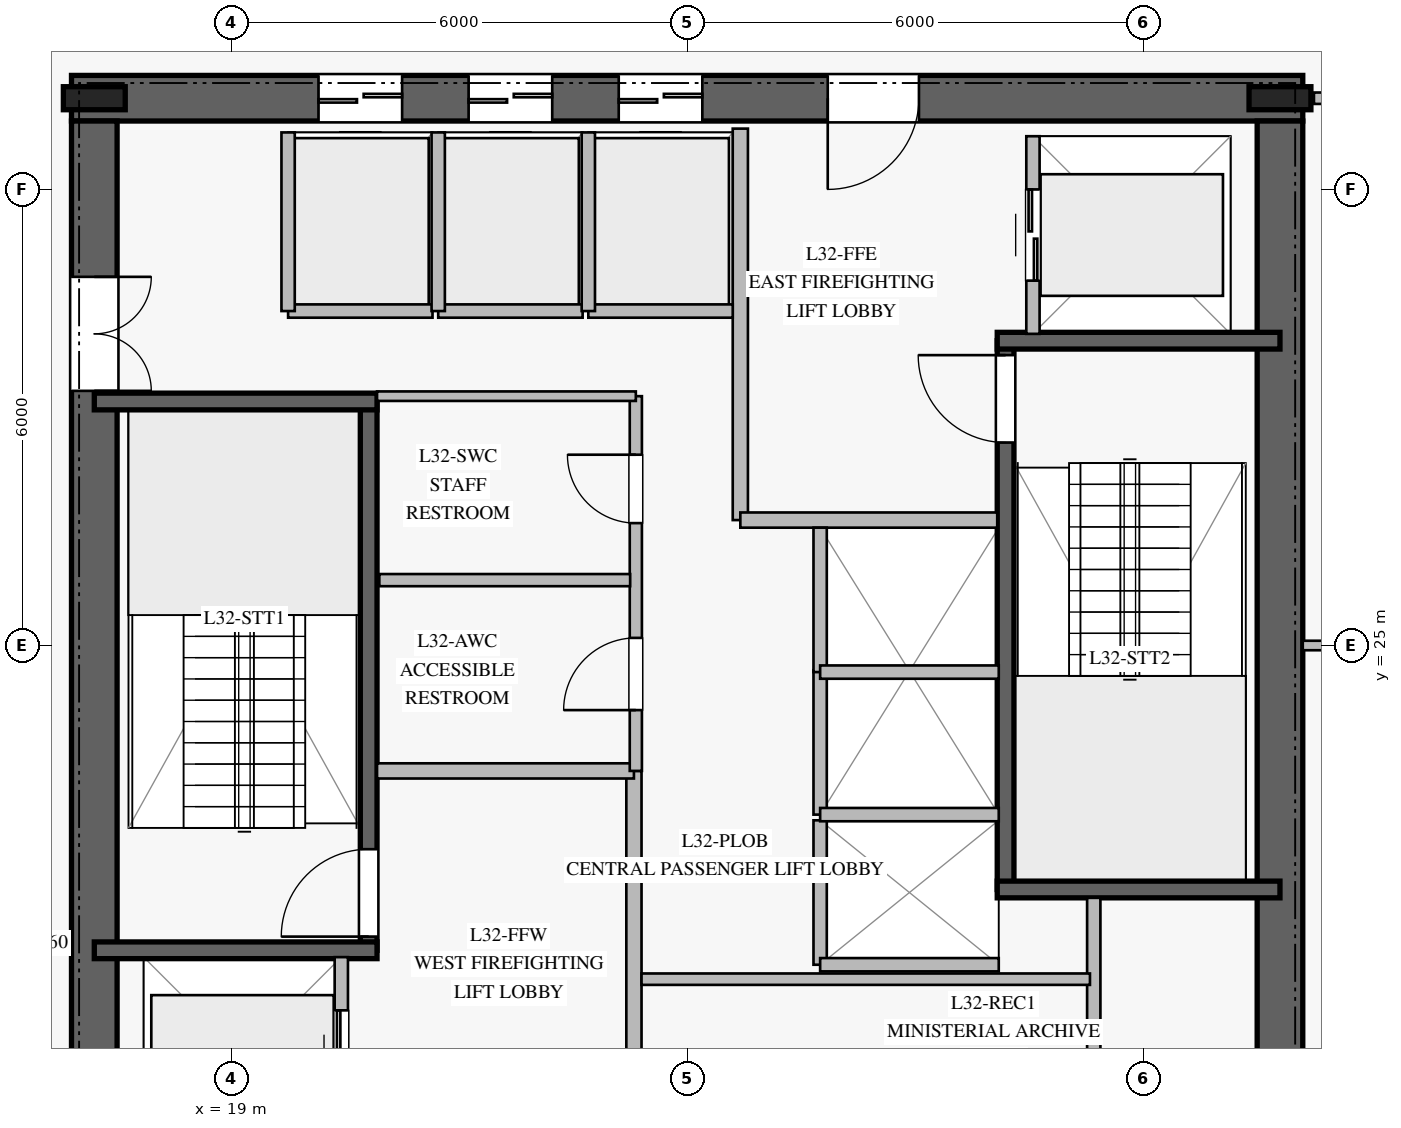
"""IFC4 building model, lengths in metres.
Left out: names, types, materials, properties, quantities, classifications, styles, units other than length and angle.
Written with IfcOpenShell. Run it as: python <this file> out.ifc"""

import sys

from ifc_helpers import new_model, si_unit, direction, frame, frame_2d, origin, origin_2d, place, context, subcontext, project, spatial, rectangle, i_section, extrude, element, fill, save


model = new_model("IFC4")
c1 = context("Model", 3, precision=1e-05, world=origin(), true_north=direction((0.0, 1.0)))
c2 = subcontext(c1, "Body", "Model", "MODEL_VIEW")
j1 = project(units=[si_unit("LENGTHUNIT", "METRE"), si_unit("PLANEANGLEUNIT", "RADIAN")], contexts=[c1])
p1 = place(None, origin())
s1 = spatial("IfcSite", under=j1, at=p1, CompositionType="ELEMENT")
p2 = place(p1, origin())
s2 = spatial("IfcBuilding", under=s1, at=p2, CompositionType="ELEMENT")
p3 = place(p2, frame((0.0, 0.0, 134.4)))
s3 = spatial("IfcBuildingStorey", under=s2, at=p3, CompositionType="ELEMENT", Elevation=134.4)
p4 = place(p3, frame((33.1, 32.2, 0.0), z_axis=(0.0, 0.0, 1.0), x_axis=(-1.0, 0.0, 0.0)))
e1 = element("IfcWall", 1, at=p4, inside=s3, PredefinedType="SHEAR", context=c2, shape_type="SweptSolid", body=[
    extrude(rectangle(XDim=16.2, YDim=0.6, at=frame_2d((8.1, 0.0))), origin(), (0.0, 0.0, 1.0), 3.76),
])
p5 = place(p4, frame((5.05, 0.0, 0.0)))
e2 = element("IfcOpeningElement", 2, at=p5, cuts=e1, PredefinedType="OPENING", context=c2, shape_type="SweptSolid", body=[
    extrude(rectangle(XDim=1.2, YDim=2.25, at=frame_2d((0.6, 1.125))), frame((0.0, 0.31, 0.0), z_axis=(0.0, -1.0, 0.0), x_axis=(1.0, 0.0, 0.0)), (0.0, 0.0, 1.0), 0.62),
])
p6 = place(p4, frame((11.85, 0.0, 0.0)))
e3 = element("IfcOpeningElement", 3, at=p6, cuts=e1, PredefinedType="OPENING", context=c2, shape_type="SweptSolid", body=[
    extrude(rectangle(XDim=1.1, YDim=2.2, at=frame_2d((0.55, 1.1))), frame((0.0, 0.31, 0.0), z_axis=(0.0, -1.0, 0.0), x_axis=(1.0, 0.0, 0.0)), (0.0, 0.0, 1.0), 0.62),
])
p7 = place(p4, frame((9.875, 0.0, 0.0)))
e4 = element("IfcOpeningElement", 4, at=p7, cuts=e1, PredefinedType="OPENING", context=c2, shape_type="SweptSolid", body=[
    extrude(rectangle(XDim=1.1, YDim=2.2, at=frame_2d((0.55, 1.1))), frame((0.0, 0.31, 0.0), z_axis=(0.0, -1.0, 0.0), x_axis=(1.0, 0.0, 0.0)), (0.0, 0.0, 1.0), 0.62),
])
p8 = place(p4, frame((7.9, 0.0, 0.0)))
e5 = element("IfcOpeningElement", 5, at=p8, cuts=e1, PredefinedType="OPENING", context=c2, shape_type="SweptSolid", body=[
    extrude(rectangle(XDim=1.1, YDim=2.2, at=frame_2d((0.55, 1.1))), frame((0.0, 0.31, 0.0), z_axis=(0.0, -1.0, 0.0), x_axis=(1.0, 0.0, 0.0)), (0.0, 0.0, 1.0), 0.62),
])
p9 = place(p3, frame((17.2, 31.9, 0.0), z_axis=(0.0, 0.0, 1.0), x_axis=(0.0, -1.0, 0.0)))
e6 = element("IfcWall", 6, at=p9, inside=s3, PredefinedType="SHEAR", context=c2, shape_type="SweptSolid", body=[
    extrude(rectangle(XDim=13.8, YDim=0.6, at=frame_2d((6.9, 0.0))), origin(), (0.0, 0.0, 1.0), 3.76),
])
p10 = place(p9, frame((2.05, 0.0, 0.0)))
e7 = element("IfcOpeningElement", 7, at=p10, cuts=e6, PredefinedType="OPENING", context=c2, shape_type="SweptSolid", body=[
    extrude(rectangle(XDim=1.5, YDim=2.2, at=frame_2d((0.75, 1.1))), frame((0.0, 0.31, 0.0), z_axis=(0.0, -1.0, 0.0), x_axis=(1.0, 0.0, 0.0)), (0.0, 0.0, 1.0), 0.62),
])
p11 = place(p3, frame((32.8, 18.1, 0.0), z_axis=(0.0, 0.0, 1.0), x_axis=(0.0, 1.0, 0.0)))
e8 = element("IfcWall", 8, at=p11, inside=s3, PredefinedType="SHEAR", context=c2, shape_type="SweptSolid", body=[
    extrude(rectangle(XDim=13.8, YDim=0.6, at=frame_2d((6.9, 0.0))), origin(), (0.0, 0.0, 1.0), 3.76),
])
for number, where, z_axis, x_axis in (
    (9, (32.8, 32.2, 0.0), (0.0, 0.0, 1.0), (1.0, 0.0, 0.0)),
    (10, (17.2, 32.2, 0.0), (0.0, 0.0, 1.0), (1.0, 0.0, 0.0)),
):
    element("IfcColumn", number, at=place(p3, frame(where, z_axis=z_axis, x_axis=x_axis)), inside=s3, PredefinedType="COLUMN", context=c2, shape_type="SweptSolid", body=[
        extrude(i_section(OverallWidth=0.303, OverallDepth=0.814, WebThickness=0.021, FlangeThickness=0.04, at=origin_2d()), origin(), (0.0, 0.0, 1.0), 4.0),
    ])
p12 = place(p3, frame((20.81, 20.99, 0.0), z_axis=(0.0, 0.0, 1.0), x_axis=(0.0, 1.0, 0.0)))
e11 = element("IfcWall", 11, at=p12, inside=s3, PredefinedType="SOLIDWALL", context=c2, shape_type="SweptSolid", body=[
    extrude(rectangle(XDim=7.22, YDim=0.22, at=frame_2d((3.61, 0.0))), origin(), (0.0, 0.0, 1.0), 3.76),
])
p13 = place(p12, frame((0.18, 0.0, 0.0)))
e12 = element("IfcOpeningElement", 12, at=p13, cuts=e11, PredefinedType="OPENING", context=c2, shape_type="SweptSolid", body=[
    extrude(rectangle(XDim=1.15, YDim=2.2, at=frame_2d((0.575, 1.1))), frame((0.0, 0.12, 0.0), z_axis=(0.0, -1.0, 0.0), x_axis=(1.0, 0.0, 0.0)), (0.0, 0.0, 1.0), 0.24),
])
for number, where, z_axis, x_axis in (
    (13, (17.2, 20.99, 0.0), (0.0, 0.0, 1.0), (1.0, 0.0, 0.0)),
    (14, (17.2, 28.21, 0.0), (0.0, 0.0, 1.0), (1.0, 0.0, 0.0)),
):
    element("IfcWall", number, at=place(p3, frame(where, z_axis=z_axis, x_axis=x_axis)), inside=s3, PredefinedType="SOLIDWALL", context=c2, shape_type="SweptSolid", body=[
        extrude(rectangle(XDim=3.72, YDim=0.22, at=frame_2d((1.86, 0.0))), origin(), (0.0, 0.0, 1.0), 3.76),
    ])
p14 = place(p3, frame((29.19, 21.79, 0.0), z_axis=(0.0, 0.0, 1.0), x_axis=(0.0, 1.0, 0.0)))
e15 = element("IfcWall", 15, at=p14, inside=s3, PredefinedType="SOLIDWALL", context=c2, shape_type="SweptSolid", body=[
    extrude(rectangle(XDim=7.22, YDim=0.22, at=frame_2d((3.61, 0.0))), origin(), (0.0, 0.0, 1.0), 3.76),
])
p15 = place(p14, frame((5.88, 0.0, 0.0)))
e16 = element("IfcOpeningElement", 16, at=p15, cuts=e15, PredefinedType="OPENING", context=c2, shape_type="SweptSolid", body=[
    extrude(rectangle(XDim=1.15, YDim=2.2, at=frame_2d((0.575, 1.1))), frame((0.0, 0.12, 0.0), z_axis=(0.0, -1.0, 0.0), x_axis=(1.0, 0.0, 0.0)), (0.0, 0.0, 1.0), 0.24),
])
for number, where, z_axis, x_axis in (
    (17, (29.08, 21.79, 0.0), (0.0, 0.0, 1.0), (1.0, 0.0, 0.0)),
    (18, (29.08, 29.01, 0.0), (0.0, 0.0, 1.0), (1.0, 0.0, 0.0)),
):
    element("IfcWall", number, at=place(p3, frame(where, z_axis=z_axis, x_axis=x_axis)), inside=s3, PredefinedType="SOLIDWALL", context=c2, shape_type="SweptSolid", body=[
        extrude(rectangle(XDim=3.72, YDim=0.22, at=frame_2d((1.86, 0.0))), origin(), (0.0, 0.0, 1.0), 3.76),
    ])
p16 = place(p3, frame((24.3, 18.2, 0.0), z_axis=(0.0, 0.0, 1.0), x_axis=(0.0, 1.0, 0.0)))
e19 = element("IfcWall", 19, at=p16, inside=s3, PredefinedType="PARTITIONING", context=c2, shape_type="SweptSolid", body=[
    extrude(rectangle(XDim=5.15, YDim=0.2, at=frame_2d((2.575, 0.0))), origin(), (0.0, 0.0, 1.0), 3.76),
])
p17 = place(p3, frame((20.92, 23.35, 0.0), z_axis=(0.0, 0.0, 1.0), x_axis=(1.0, 0.0, 0.0)))
e20 = element("IfcWall", 20, at=p17, inside=s3, PredefinedType="PARTITIONING", context=c2, shape_type="SweptSolid", body=[
    extrude(rectangle(XDim=3.38, YDim=0.2, at=frame_2d((1.69, 0.0))), origin(), (0.0, 0.0, 1.0), 3.76),
])
p18 = place(p3, frame((25.7, 26.65, 0.0), z_axis=(0.0, 0.0, 1.0), x_axis=(0.0, 1.0, 0.0)))
e21 = element("IfcWall", 21, at=p18, inside=s3, PredefinedType="PARTITIONING", context=c2, shape_type="SweptSolid", body=[
    extrude(rectangle(XDim=5.15, YDim=0.2, at=frame_2d((2.575, 0.0))), origin(), (0.0, 0.0, 1.0), 3.76),
])
p19 = place(p3, frame((25.7, 26.65, 0.0), z_axis=(0.0, 0.0, 1.0), x_axis=(1.0, 0.0, 0.0)))
e22 = element("IfcWall", 22, at=p19, inside=s3, PredefinedType="PARTITIONING", context=c2, shape_type="SweptSolid", body=[
    extrude(rectangle(XDim=3.38, YDim=0.2, at=frame_2d((1.69, 0.0))), origin(), (0.0, 0.0, 1.0), 3.76),
])
p20 = place(p3, frame((24.325, 23.35, 0.0), z_axis=(0.0, 0.0, 1.0), x_axis=(0.0, 1.0, 0.0)))
e23 = element("IfcWall", 23, at=p20, inside=s3, PredefinedType="PLUMBINGWALL", context=c2, shape_type="SweptSolid", body=[
    extrude(rectangle(XDim=4.93, YDim=0.16, at=frame_2d((2.465, 0.0))), origin(), (0.0, 0.0, 1.0), 3.76),
])
p21 = place(p20, frame((0.8, 0.0, 0.0)))
e24 = element("IfcOpeningElement", 24, at=p21, cuts=e23, PredefinedType="OPENING", context=c2, shape_type="SweptSolid", body=[
    extrude(rectangle(XDim=0.95, YDim=2.1, at=frame_2d((0.475, 1.05))), frame((0.0, 0.09, 0.0), z_axis=(0.0, -1.0, 0.0), x_axis=(1.0, 0.0, 0.0)), (0.0, 0.0, 1.0), 0.18),
])
p22 = place(p20, frame((3.26, 0.0, 0.0)))
e25 = element("IfcOpeningElement", 25, at=p22, cuts=e23, PredefinedType="OPENING", context=c2, shape_type="SweptSolid", body=[
    extrude(rectangle(XDim=0.9, YDim=2.1, at=frame_2d((0.45, 1.05))), frame((0.0, 0.09, 0.0), z_axis=(0.0, -1.0, 0.0), x_axis=(1.0, 0.0, 0.0)), (0.0, 0.0, 1.0), 0.18),
])
p23 = place(p3, frame((20.92, 28.28, 0.0), z_axis=(0.0, 0.0, 1.0), x_axis=(1.0, 0.0, 0.0)))
e26 = element("IfcWall", 26, at=p23, inside=s3, PredefinedType="PARTITIONING", context=c2, shape_type="SweptSolid", body=[
    extrude(rectangle(XDim=3.405, YDim=0.125, at=frame_2d((1.703, 0.0))), origin(), (0.0, 0.0, 1.0), 3.76),
])
p24 = place(p3, frame((20.95, 25.86, 0.0), z_axis=(0.0, 0.0, 1.0), x_axis=(1.0, 0.0, 0.0)))
e27 = element("IfcWall", 27, at=p24, inside=s3, PredefinedType="PLUMBINGWALL", context=c2, shape_type="SweptSolid", body=[
    extrude(rectangle(XDim=3.3, YDim=0.16, at=frame_2d((1.65, 0.0))), origin(), (0.0, 0.0, 1.0), 3.76),
])
p25 = place(p3, frame((30.35, 18.2, 0.0), z_axis=(0.0, 0.0, 1.0), x_axis=(0.0, 1.0, 0.0)))
e28 = element("IfcWall", 28, at=p25, inside=s3, PredefinedType="PARTITIONING", context=c2, shape_type="SweptSolid", body=[
    extrude(rectangle(XDim=3.48, YDim=0.175, at=frame_2d((1.74, 0.0))), origin(), (0.0, 0.0, 1.0), 3.76),
])
p26 = place(p3, frame((24.4, 20.61, 0.0), z_axis=(0.0, 0.0, 1.0), x_axis=(1.0, 0.0, 0.0)))
e29 = element("IfcWall", 29, at=p26, inside=s3, PredefinedType="PARTITIONING", context=c2, shape_type="SweptSolid", body=[
    extrude(rectangle(XDim=5.9, YDim=0.15, at=frame_2d((2.95, 0.0))), origin(), (0.0, 0.0, 1.0), 3.76),
])
p27 = place(p3, frame((19.75, 29.4, 0.0), z_axis=(0.0, 0.0, 1.0), x_axis=(1.0, 0.0, 0.0)))
e30 = element("IfcWall", 30, at=p27, inside=s3, PredefinedType="PARTITIONING", context=c2, shape_type="SweptSolid", body=[
    extrude(rectangle(XDim=1.9, YDim=0.175, at=frame_2d((0.95, 0.0))), origin(), (0.0, 0.0, 1.0), 3.76),
])
p28 = place(p3, frame((19.75, 29.4, 0.0), z_axis=(0.0, 0.0, 1.0), x_axis=(0.0, 1.0, 0.0)))
e31 = element("IfcWall", 31, at=p28, inside=s3, PredefinedType="PARTITIONING", context=c2, shape_type="SweptSolid", body=[
    extrude(rectangle(XDim=2.35, YDim=0.175, at=frame_2d((1.175, 0.0))), origin(), (0.0, 0.0, 1.0), 3.76),
])
p29 = place(p3, frame((21.725, 29.4, 0.0), z_axis=(0.0, 0.0, 1.0), x_axis=(1.0, 0.0, 0.0)))
e32 = element("IfcWall", 32, at=p29, inside=s3, PredefinedType="PARTITIONING", context=c2, shape_type="SweptSolid", body=[
    extrude(rectangle(XDim=1.9, YDim=0.175, at=frame_2d((0.95, 0.0))), origin(), (0.0, 0.0, 1.0), 3.76),
])
p30 = place(p3, frame((21.725, 29.4, 0.0), z_axis=(0.0, 0.0, 1.0), x_axis=(0.0, 1.0, 0.0)))
e33 = element("IfcWall", 33, at=p30, inside=s3, PredefinedType="PARTITIONING", context=c2, shape_type="SweptSolid", body=[
    extrude(rectangle(XDim=2.35, YDim=0.175, at=frame_2d((1.175, 0.0))), origin(), (0.0, 0.0, 1.0), 3.76),
])
p31 = place(p3, frame((23.7, 29.4, 0.0), z_axis=(0.0, 0.0, 1.0), x_axis=(1.0, 0.0, 0.0)))
e34 = element("IfcWall", 34, at=p31, inside=s3, PredefinedType="PARTITIONING", context=c2, shape_type="SweptSolid", body=[
    extrude(rectangle(XDim=1.9, YDim=0.175, at=frame_2d((0.95, 0.0))), origin(), (0.0, 0.0, 1.0), 3.76),
])
p32 = place(p3, frame((23.7, 29.4, 0.0), z_axis=(0.0, 0.0, 1.0), x_axis=(0.0, 1.0, 0.0)))
e35 = element("IfcWall", 35, at=p32, inside=s3, PredefinedType="PARTITIONING", context=c2, shape_type="SweptSolid", body=[
    extrude(rectangle(XDim=2.35, YDim=0.175, at=frame_2d((1.175, 0.0))), origin(), (0.0, 0.0, 1.0), 3.76),
])
p33 = place(p3, frame((26.75, 20.8, 0.0), z_axis=(0.0, 0.0, 1.0), x_axis=(0.0, 1.0, 0.0)))
e36 = element("IfcWall", 36, at=p33, inside=s3, PredefinedType="PARTITIONING", context=c2, shape_type="SweptSolid", body=[
    extrude(rectangle(XDim=1.9, YDim=0.175, at=frame_2d((0.95, 0.0))), origin(), (0.0, 0.0, 1.0), 3.76),
])
p34 = place(p3, frame((26.75, 20.8, 0.0), z_axis=(0.0, 0.0, 1.0), x_axis=(1.0, 0.0, 0.0)))
e37 = element("IfcWall", 37, at=p34, inside=s3, PredefinedType="PARTITIONING", context=c2, shape_type="SweptSolid", body=[
    extrude(rectangle(XDim=2.35, YDim=0.175, at=frame_2d((1.175, 0.0))), origin(), (0.0, 0.0, 1.0), 3.76),
])
p35 = place(p3, frame((26.75, 22.775, 0.0), z_axis=(0.0, 0.0, 1.0), x_axis=(0.0, 1.0, 0.0)))
e38 = element("IfcWall", 38, at=p35, inside=s3, PredefinedType="PARTITIONING", context=c2, shape_type="SweptSolid", body=[
    extrude(rectangle(XDim=1.9, YDim=0.175, at=frame_2d((0.95, 0.0))), origin(), (0.0, 0.0, 1.0), 3.76),
])
p36 = place(p3, frame((26.75, 22.775, 0.0), z_axis=(0.0, 0.0, 1.0), x_axis=(1.0, 0.0, 0.0)))
e39 = element("IfcWall", 39, at=p36, inside=s3, PredefinedType="PARTITIONING", context=c2, shape_type="SweptSolid", body=[
    extrude(rectangle(XDim=2.35, YDim=0.175, at=frame_2d((1.175, 0.0))), origin(), (0.0, 0.0, 1.0), 3.76),
])
p37 = place(p3, frame((26.75, 24.65, 0.0), z_axis=(0.0, 0.0, 1.0), x_axis=(0.0, 1.0, 0.0)))
e40 = element("IfcWall", 40, at=p37, inside=s3, PredefinedType="PARTITIONING", context=c2, shape_type="SweptSolid", body=[
    extrude(rectangle(XDim=1.9, YDim=0.175, at=frame_2d((0.95, 0.0))), origin(), (0.0, 0.0, 1.0), 3.76),
])
p38 = place(p3, frame((26.75, 24.65, 0.0), z_axis=(0.0, 0.0, 1.0), x_axis=(1.0, 0.0, 0.0)))
e41 = element("IfcWall", 41, at=p38, inside=s3, PredefinedType="PARTITIONING", context=c2, shape_type="SweptSolid", body=[
    extrude(rectangle(XDim=2.35, YDim=0.175, at=frame_2d((1.175, 0.0))), origin(), (0.0, 0.0, 1.0), 3.76),
])
p39 = place(p3, frame((20.45, 18.3, 0.0), z_axis=(0.0, 0.0, 1.0), x_axis=(0.0, 1.0, 0.0)))
e42 = element("IfcWall", 42, at=p39, inside=s3, PredefinedType="PARTITIONING", context=c2, shape_type="SweptSolid", body=[
    extrude(rectangle(XDim=2.6, YDim=0.175, at=frame_2d((1.3, 0.0))), origin(), (0.0, 0.0, 1.0), 3.76),
])
p40 = place(p39, frame((0.7, 0.0, 0.0)))
e43 = element("IfcOpeningElement", 43, at=p40, cuts=e42, PredefinedType="OPENING", context=c2, shape_type="SweptSolid", body=[
    extrude(rectangle(XDim=1.2, YDim=2.2, at=frame_2d((0.6, 1.1))), frame((0.0, 0.098, 0.0), z_axis=(0.0, -1.0, 0.0), x_axis=(1.0, 0.0, 0.0)), (0.0, 0.0, 1.0), 0.195),
])
p41 = place(p3, frame((29.55, 29.1, 0.0), z_axis=(0.0, 0.0, 1.0), x_axis=(0.0, 1.0, 0.0)))
e44 = element("IfcWall", 44, at=p41, inside=s3, PredefinedType="PARTITIONING", context=c2, shape_type="SweptSolid", body=[
    extrude(rectangle(XDim=2.6, YDim=0.175, at=frame_2d((1.3, 0.0))), origin(), (0.0, 0.0, 1.0), 3.76),
])
p42 = place(p41, frame((0.7, 0.0, 0.0)))
e45 = element("IfcOpeningElement", 45, at=p42, cuts=e44, PredefinedType="OPENING", context=c2, shape_type="SweptSolid", body=[
    extrude(rectangle(XDim=1.2, YDim=2.2, at=frame_2d((0.6, 1.1))), frame((0.0, 0.098, 0.0), z_axis=(0.0, -1.0, 0.0), x_axis=(1.0, 0.0, 0.0)), (0.0, 0.0, 1.0), 0.195),
])
p43 = place(p3, frame((41.2, 32.2, 0.0), z_axis=(0.0, 0.0, 1.0), x_axis=(-1.0, 0.0, 0.0)))
e46 = element("IfcWall", 46, at=p43, inside=s3, PredefinedType="PARTITIONING", context=c2, shape_type="SweptSolid", body=[
    extrude(rectangle(XDim=7.953, YDim=0.15, at=frame_2d((3.977, 0.0))), origin(), (0.0, 0.0, 1.0), 3.21),
])
p44 = place(p3, frame((33.1, 25.0, 0.0), z_axis=(0.0, 0.0, 1.0), x_axis=(1.0, 0.0, 0.0)))
e47 = element("IfcWall", 47, at=p44, inside=s3, PredefinedType="PARTITIONING", context=c2, shape_type="SweptSolid", body=[
    extrude(rectangle(XDim=11.667, YDim=0.125, at=frame_2d((5.833, 0.0))), origin(), (0.0, 0.0, 1.0), 3.16),
])
p45 = place(p13, origin())
e48 = element("IfcDoor", 48, at=p45, inside=s3, OperationType="SINGLE_SWING_LEFT", PredefinedType="DOOR", context=c2, shape_type="SweptSolid", body=[
    extrude(rectangle(XDim=1.15, YDim=2.2, at=frame_2d((0.575, 1.1))), frame((0.0, 0.025, 0.0), z_axis=(0.0, -1.0, 0.0), x_axis=(1.0, 0.0, 0.0)), (0.0, 0.0, 1.0), 0.05),
])
fill(e12, e48)
p46 = place(p15, origin())
e49 = element("IfcDoor", 49, at=p46, inside=s3, OperationType="SINGLE_SWING_RIGHT", PredefinedType="DOOR", context=c2, shape_type="SweptSolid", body=[
    extrude(rectangle(XDim=1.15, YDim=2.2, at=frame_2d((0.575, 1.1))), frame((0.0, 0.025, 0.0), z_axis=(0.0, -1.0, 0.0), x_axis=(1.0, 0.0, 0.0)), (0.0, 0.0, 1.0), 0.05),
])
fill(e16, e49)
p47 = place(p5, origin())
e50 = element("IfcDoor", 50, at=p47, inside=s3, OperationType="SINGLE_SWING_RIGHT", PredefinedType="DOOR", context=c2, shape_type="SweptSolid", body=[
    extrude(rectangle(XDim=1.2, YDim=2.25, at=frame_2d((0.6, 1.125))), frame((0.0, 0.025, 0.0), z_axis=(0.0, -1.0, 0.0), x_axis=(1.0, 0.0, 0.0)), (0.0, 0.0, 1.0), 0.05),
])
fill(e2, e50)
p48 = place(p10, origin())
e51 = element("IfcDoor", 51, at=p48, inside=s3, OperationType="DOUBLE_DOOR_SINGLE_SWING", PredefinedType="DOOR", context=c2, shape_type="SweptSolid", body=[
    extrude(rectangle(XDim=1.5, YDim=2.2, at=frame_2d((0.75, 1.1))), frame((0.0, 0.025, 0.0), z_axis=(0.0, -1.0, 0.0), x_axis=(1.0, 0.0, 0.0)), (0.0, 0.0, 1.0), 0.05),
])
fill(e7, e51)
p49 = place(p21, origin())
e52 = element("IfcDoor", 52, at=p49, inside=s3, OperationType="SINGLE_SWING_LEFT", PredefinedType="DOOR", context=c2, shape_type="SweptSolid", body=[
    extrude(rectangle(XDim=0.95, YDim=2.1, at=frame_2d((0.475, 1.05))), frame((0.0, 0.025, 0.0), z_axis=(0.0, -1.0, 0.0), x_axis=(1.0, 0.0, 0.0)), (0.0, 0.0, 1.0), 0.05),
])
fill(e24, e52)
p50 = place(p22, origin())
e53 = element("IfcDoor", 53, at=p50, inside=s3, OperationType="SINGLE_SWING_RIGHT", PredefinedType="DOOR", context=c2, shape_type="SweptSolid", body=[
    extrude(rectangle(XDim=0.9, YDim=2.1, at=frame_2d((0.45, 1.05))), frame((0.0, 0.025, 0.0), z_axis=(0.0, -1.0, 0.0), x_axis=(1.0, 0.0, 0.0)), (0.0, 0.0, 1.0), 0.05),
])
fill(e25, e53)
p51 = place(p6, origin())
e54 = element("IfcDoor", 54, at=p51, inside=s3, OperationType="DOUBLE_DOOR_SLIDING", PredefinedType="DOOR", context=c2, shape_type="SweptSolid", body=[
    extrude(rectangle(XDim=1.1, YDim=2.2, at=frame_2d((0.55, 1.1))), frame((0.0, 0.025, 0.0), z_axis=(0.0, -1.0, 0.0), x_axis=(1.0, 0.0, 0.0)), (0.0, 0.0, 1.0), 0.05),
])
fill(e3, e54)
p52 = place(p7, origin())
e55 = element("IfcDoor", 55, at=p52, inside=s3, OperationType="DOUBLE_DOOR_SLIDING", PredefinedType="DOOR", context=c2, shape_type="SweptSolid", body=[
    extrude(rectangle(XDim=1.1, YDim=2.2, at=frame_2d((0.55, 1.1))), frame((0.0, 0.025, 0.0), z_axis=(0.0, -1.0, 0.0), x_axis=(1.0, 0.0, 0.0)), (0.0, 0.0, 1.0), 0.05),
])
fill(e4, e55)
p53 = place(p8, origin())
e56 = element("IfcDoor", 56, at=p53, inside=s3, OperationType="DOUBLE_DOOR_SLIDING", PredefinedType="DOOR", context=c2, shape_type="SweptSolid", body=[
    extrude(rectangle(XDim=1.1, YDim=2.2, at=frame_2d((0.55, 1.1))), frame((0.0, 0.025, 0.0), z_axis=(0.0, -1.0, 0.0), x_axis=(1.0, 0.0, 0.0)), (0.0, 0.0, 1.0), 0.05),
])
fill(e5, e56)
p54 = place(p40, origin())
e57 = element("IfcDoor", 57, at=p54, inside=s3, OperationType="DOUBLE_DOOR_SLIDING", PredefinedType="DOOR", context=c2, shape_type="SweptSolid", body=[
    extrude(rectangle(XDim=1.2, YDim=2.2, at=frame_2d((0.6, 1.1))), frame((0.0, 0.025, 0.0), z_axis=(0.0, -1.0, 0.0), x_axis=(1.0, 0.0, 0.0)), (0.0, 0.0, 1.0), 0.05),
])
fill(e43, e57)
p55 = place(p42, origin())
e58 = element("IfcDoor", 58, at=p55, inside=s3, OperationType="DOUBLE_DOOR_SLIDING", PredefinedType="DOOR", context=c2, shape_type="SweptSolid", body=[
    extrude(rectangle(XDim=1.2, YDim=2.2, at=frame_2d((0.6, 1.1))), frame((0.0, 0.025, 0.0), z_axis=(0.0, -1.0, 0.0), x_axis=(1.0, 0.0, 0.0)), (0.0, 0.0, 1.0), 0.05),
])
fill(e45, e58)
save(model, sys.argv[1])
